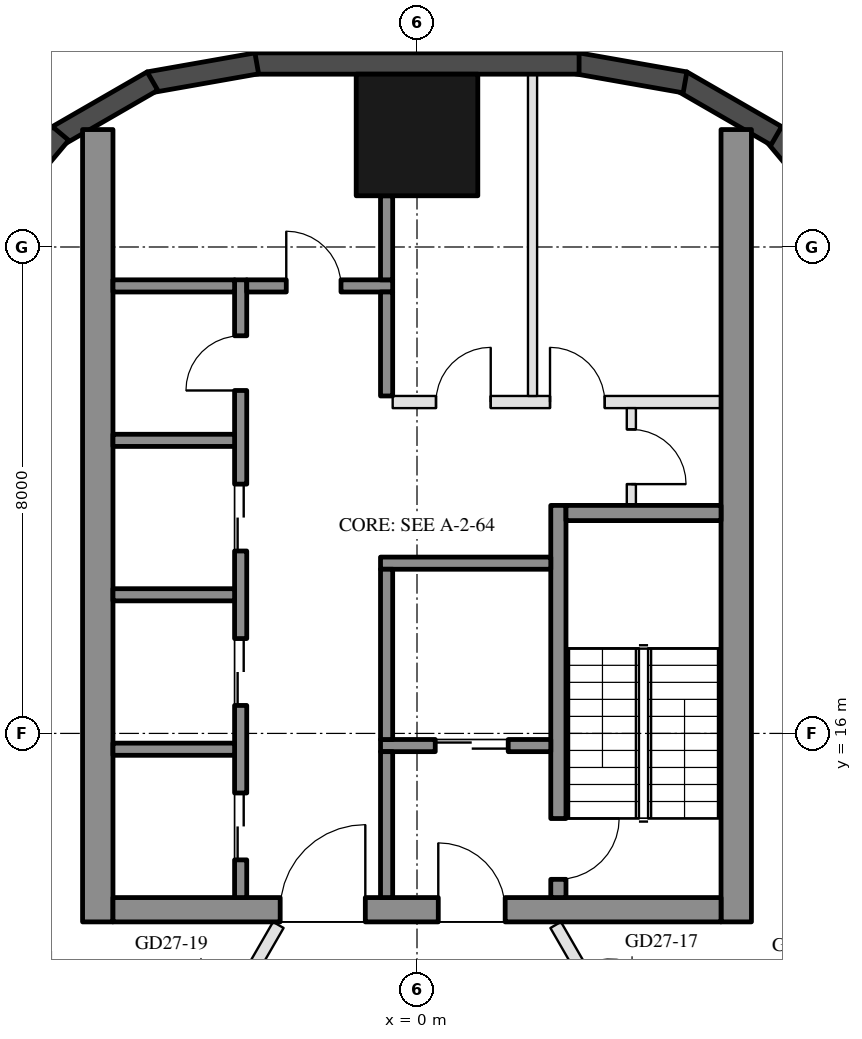
"""IFC4 building model, lengths in metres.
Left out: names, types, materials, properties, quantities, classifications, styles, units other than length and angle.
Written with IfcOpenShell. Run it as: python <this file> out.ifc"""

import sys

from ifc_helpers import new_model, si_unit, direction, frame, frame_2d, origin, origin_2d, place, context, subcontext, project, spatial, rectangle, hollow_rectangle, extrude, boolean, halfspace, element, fill, save


model = new_model("IFC4")
c1 = context("Model", 3, precision=1e-05, world=origin(), true_north=direction((0.0, 1.0)))
c2 = subcontext(c1, "Body", "Model", "MODEL_VIEW")
j1 = project(units=[si_unit("LENGTHUNIT", "METRE"), si_unit("PLANEANGLEUNIT", "RADIAN")], contexts=[c1])
p1 = place(None, origin())
s1 = spatial("IfcSite", under=j1, at=p1, CompositionType="ELEMENT")
p2 = place(p1, origin())
s2 = spatial("IfcBuilding", under=s1, at=p2, CompositionType="ELEMENT")
p3 = place(p2, frame((0.0, 0.0, 276.3)))
s3 = spatial("IfcBuildingStorey", under=s2, at=p3, CompositionType="ELEMENT", Elevation=276.3)
p4 = place(p3, frame((0.0, 25.843, 0.0), z_axis=(0.0, -0.21982618752, 0.975539054718), x_axis=(1.0, 0.0, 0.0)))
e1 = element("IfcColumn", 1, at=p4, inside=s3, PredefinedType="COLUMN", context=c2, shape_type="SweptSolid", body=[
    boolean("DIFFERENCE", boolean("DIFFERENCE", extrude(hollow_rectangle(XDim=2.0, YDim=2.0, WallThickness=0.05, at=origin_2d()), origin(), (0.0, 0.0, 1.0), 3.793), halfspace(frame((0.0, 0.0, 0.113), z_axis=(0.0, 0.0, 1.0), x_axis=(1.0, 0.0, 0.0)), True)), halfspace(frame((0.0, 0.0, 3.679), z_axis=(0.0, 0.0, 1.0), x_axis=(1.0, 0.0, 0.0)), False)),
])
p5 = place(p3, frame((7.019, 24.489, 0.0), z_axis=(0.0, 0.0, 1.0), x_axis=(-0.642756114672, 0.766070869471, 0.0)))
e2 = element("IfcWall", 2, at=p5, inside=s3, PredefinedType="SOLIDWALL", context=c2, shape_type="SweptSolid", body=[
    extrude(rectangle(XDim=1.8, YDim=0.35, at=frame_2d((0.9, 0.0))), origin(), (0.0, 0.0, 1.0), 3.55),
])
for number, where, z_axis, x_axis in (
    (3, (5.909, 25.829, 0.0), (0.0, 0.0, 1.0), (-0.866, 0.5, 0.0)),
    (4, (4.408, 26.708, 0.0), (0.0, 0.0, 1.0), (-0.985, 0.174, 0.0)),
):
    element("IfcWall", number, at=place(p3, frame(where, z_axis=z_axis, x_axis=x_axis)), inside=s3, PredefinedType="SOLIDWALL", context=c2, shape_type="SweptSolid", body=[
        extrude(rectangle(XDim=1.8, YDim=0.35, at=frame_2d((0.9, 0.0))), origin(), (0.0, 0.0, 1.0), 3.55),
    ])
p6 = place(p3, frame((2.666, 27.018, 0.0), z_axis=(0.0, 0.0, 1.0), x_axis=(-1.0, 0.0, 0.0)))
e5 = element("IfcWall", 5, at=p6, inside=s3, PredefinedType="SOLIDWALL", context=c2, shape_type="SweptSolid", body=[
    extrude(rectangle(XDim=5.331, YDim=0.35, at=frame_2d((2.666, 0.0))), origin(), (0.0, 0.0, 1.0), 3.55),
])
for number, where, z_axis, x_axis in (
    (6, (-2.635, 27.02, 0.0), (0.0, 0.0, 1.0), (-0.985, -0.174, 0.0)),
    (7, (-4.351, 26.729, 0.0), (0.0, 0.0, 1.0), (-0.866, -0.5, 0.0)),
):
    element("IfcWall", number, at=place(p3, frame(where, z_axis=z_axis, x_axis=x_axis)), inside=s3, PredefinedType="SOLIDWALL", context=c2, shape_type="SweptSolid", body=[
        extrude(rectangle(XDim=1.8, YDim=0.35, at=frame_2d((0.9, 0.0))), origin(), (0.0, 0.0, 1.0), 3.55),
    ])
p7 = place(p3, frame((-5.863, 25.868, 0.0), z_axis=(0.0, 0.0, 1.0), x_axis=(-0.642756114672, -0.766070869471, 0.0)))
e8 = element("IfcWall", 8, at=p7, inside=s3, PredefinedType="SOLIDWALL", context=c2, shape_type="SweptSolid", body=[
    extrude(rectangle(XDim=1.8, YDim=0.35, at=frame_2d((0.9, 0.0))), origin(), (0.0, 0.0, 1.0), 3.55),
])
for number, where, z_axis, x_axis in (
    (9, (5.25, 12.9, 0.0), (0.0, 0.0, 1.0), (0.0, 1.0, 0.0)),
    (10, (-5.25, 12.9, 0.0), (0.0, 0.0, 1.0), (0.0, 1.0, 0.0)),
):
    element("IfcWall", number, at=place(p3, frame(where, z_axis=z_axis, x_axis=x_axis)), inside=s3, PredefinedType="SHEAR", context=c2, shape_type="SweptSolid", body=[
        extrude(rectangle(XDim=13.031, YDim=0.5, at=frame_2d((6.516, 0.0))), origin(), (0.0, 0.0, 1.0), 3.5),
    ])
p8 = place(p3, frame((5.0, 13.1, 0.0), z_axis=(0.0, 0.0, 1.0), x_axis=(-1.0, 0.0, 0.0)))
e11 = element("IfcWall", 11, at=p8, inside=s3, PredefinedType="SHEAR", context=c2, shape_type="SweptSolid", body=[
    extrude(rectangle(XDim=10.0, YDim=0.4, at=frame_2d((5.0, 0.0))), origin(), (0.0, 0.0, 1.0), 3.5),
])
p9 = place(p8, frame((3.55, 0.0, 0.0)))
e12 = element("IfcOpeningElement", 12, at=p9, cuts=e11, PredefinedType="OPENING", context=c2, shape_type="SweptSolid", body=[
    extrude(rectangle(XDim=1.1, YDim=2.1, at=frame_2d((0.55, 1.05))), frame((0.0, 0.21, 0.0), z_axis=(0.0, -1.0, 0.0), x_axis=(1.0, 0.0, 0.0)), (0.0, 0.0, 1.0), 0.42),
])
p10 = place(p8, frame((5.85, 0.0, 0.0)))
e13 = element("IfcOpeningElement", 13, at=p10, cuts=e11, PredefinedType="OPENING", context=c2, shape_type="SweptSolid", body=[
    extrude(rectangle(XDim=1.4, YDim=2.1, at=frame_2d((0.7, 1.05))), frame((0.0, 0.21, 0.0), z_axis=(0.0, -1.0, 0.0), x_axis=(1.0, 0.0, 0.0)), (0.0, 0.0, 1.0), 0.42),
])
p11 = place(p3, frame((2.325, 13.3, 0.0), z_axis=(0.0, 0.0, 1.0), x_axis=(0.0, 1.0, 0.0)))
e14 = element("IfcWall", 14, at=p11, inside=s3, PredefinedType="SHEAR", context=c2, shape_type="SweptSolid", body=[
    extrude(rectangle(XDim=6.45, YDim=0.25, at=frame_2d((3.225, 0.0))), origin(), (0.0, 0.0, 1.0), 3.5),
])
p12 = place(p11, frame((0.3, 0.0, 0.0)))
e15 = element("IfcOpeningElement", 15, at=p12, cuts=e14, PredefinedType="OPENING", context=c2, shape_type="SweptSolid", body=[
    extrude(rectangle(XDim=1.0, YDim=2.1, at=frame_2d((0.5, 1.05))), frame((0.0, 0.135, 0.0), z_axis=(0.0, -1.0, 0.0), x_axis=(1.0, 0.0, 0.0)), (0.0, 0.0, 1.0), 0.27),
])
p13 = place(p3, frame((5.0, 19.625, 0.0), z_axis=(0.0, 0.0, 1.0), x_axis=(-1.0, 0.0, 0.0)))
e16 = element("IfcWall", 16, at=p13, inside=s3, PredefinedType="SHEAR", context=c2, shape_type="SweptSolid", body=[
    extrude(rectangle(XDim=2.55, YDim=0.25, at=frame_2d((1.275, 0.0))), origin(), (0.0, 0.0, 1.0), 3.5),
])
p14 = place(p3, frame((2.2, 18.8, 0.0), z_axis=(0.0, 0.0, 1.0), x_axis=(-1.0, 0.0, 0.0)))
e17 = element("IfcWall", 17, at=p14, inside=s3, PredefinedType="SHEAR", context=c2, shape_type="SweptSolid", body=[
    extrude(rectangle(XDim=2.8, YDim=0.2, at=frame_2d((1.4, 0.0))), origin(), (0.0, 0.0, 1.0), 3.5),
])
p15 = place(p3, frame((2.2, 15.8, 0.0), z_axis=(0.0, 0.0, 1.0), x_axis=(-1.0, 0.0, 0.0)))
e18 = element("IfcWall", 18, at=p15, inside=s3, PredefinedType="SHEAR", context=c2, shape_type="SweptSolid", body=[
    extrude(rectangle(XDim=2.8, YDim=0.2, at=frame_2d((1.4, 0.0))), origin(), (0.0, 0.0, 1.0), 3.5),
])
p16 = place(p15, frame((0.7, 0.0, 0.0)))
e19 = element("IfcOpeningElement", 19, at=p16, cuts=e18, PredefinedType="OPENING", context=c2, shape_type="SweptSolid", body=[
    extrude(rectangle(XDim=1.2, YDim=2.1, at=frame_2d((0.6, 1.05))), frame((0.0, 0.11, 0.0), z_axis=(0.0, -1.0, 0.0), x_axis=(1.0, 0.0, 0.0)), (0.0, 0.0, 1.0), 0.22),
])
p17 = place(p3, frame((-0.5, 15.9, 0.0), z_axis=(0.0, 0.0, 1.0), x_axis=(0.0, 1.0, 0.0)))
e20 = element("IfcWall", 20, at=p17, inside=s3, PredefinedType="SHEAR", context=c2, shape_type="SweptSolid", body=[
    extrude(rectangle(XDim=2.8, YDim=0.2, at=frame_2d((1.4, 0.0))), origin(), (0.0, 0.0, 1.0), 3.5),
])
p18 = place(p3, frame((-0.5, 13.3, 0.0), z_axis=(0.0, 0.0, 1.0), x_axis=(0.0, 1.0, 0.0)))
e21 = element("IfcWall", 21, at=p18, inside=s3, PredefinedType="SHEAR", context=c2, shape_type="SweptSolid", body=[
    extrude(rectangle(XDim=2.4, YDim=0.2, at=frame_2d((1.2, 0.0))), origin(), (0.0, 0.0, 1.0), 3.5),
])
p19 = place(p3, frame((-2.9, 13.3, 0.0), z_axis=(0.0, 0.0, 1.0), x_axis=(0.0, 1.0, 0.0)))
e22 = element("IfcWall", 22, at=p19, inside=s3, PredefinedType="SHEAR", context=c2, shape_type="SweptSolid", body=[
    extrude(rectangle(XDim=10.16, YDim=0.2, at=frame_2d((5.08, 0.0))), origin(), (0.0, 0.0, 1.0), 3.5),
])
p20 = place(p19, frame((0.62, 0.0, 0.0)))
e23 = element("IfcOpeningElement", 23, at=p20, cuts=e22, PredefinedType="OPENING", context=c2, shape_type="SweptSolid", body=[
    extrude(rectangle(XDim=1.1, YDim=2.1, at=frame_2d((0.55, 1.05))), frame((0.0, 0.11, 0.0), z_axis=(0.0, -1.0, 0.0), x_axis=(1.0, 0.0, 0.0)), (0.0, 0.0, 1.0), 0.22),
])
p21 = place(p19, frame((3.16, 0.0, 0.0)))
e24 = element("IfcOpeningElement", 24, at=p21, cuts=e22, PredefinedType="OPENING", context=c2, shape_type="SweptSolid", body=[
    extrude(rectangle(XDim=1.1, YDim=2.1, at=frame_2d((0.55, 1.05))), frame((0.0, 0.11, 0.0), z_axis=(0.0, -1.0, 0.0), x_axis=(1.0, 0.0, 0.0)), (0.0, 0.0, 1.0), 0.22),
])
p22 = place(p19, frame((5.7, 0.0, 0.0)))
e25 = element("IfcOpeningElement", 25, at=p22, cuts=e22, PredefinedType="OPENING", context=c2, shape_type="SweptSolid", body=[
    extrude(rectangle(XDim=1.1, YDim=2.1, at=frame_2d((0.55, 1.05))), frame((0.0, 0.11, 0.0), z_axis=(0.0, -1.0, 0.0), x_axis=(1.0, 0.0, 0.0)), (0.0, 0.0, 1.0), 0.22),
])
p23 = place(p19, frame((8.34, 0.0, 0.0)))
e26 = element("IfcOpeningElement", 26, at=p23, cuts=e22, PredefinedType="OPENING", context=c2, shape_type="SweptSolid", body=[
    extrude(rectangle(XDim=0.9, YDim=2.1, at=frame_2d((0.45, 1.05))), frame((0.0, 0.11, 0.0), z_axis=(0.0, -1.0, 0.0), x_axis=(1.0, 0.0, 0.0)), (0.0, 0.0, 1.0), 0.22),
])
p24 = place(p3, frame((-0.4, 23.36, 0.0), z_axis=(0.0, 0.0, 1.0), x_axis=(-1.0, 0.0, 0.0)))
e27 = element("IfcWall", 27, at=p24, inside=s3, PredefinedType="SHEAR", context=c2, shape_type="SweptSolid", body=[
    extrude(rectangle(XDim=2.4, YDim=0.2, at=frame_2d((1.2, 0.0))), origin(), (0.0, 0.0, 1.0), 3.5),
])
p25 = place(p24, frame((0.85, 0.0, 0.0)))
e28 = element("IfcOpeningElement", 28, at=p25, cuts=e27, PredefinedType="OPENING", context=c2, shape_type="SweptSolid", body=[
    extrude(rectangle(XDim=0.9, YDim=2.1, at=frame_2d((0.45, 1.05))), frame((0.0, 0.11, 0.0), z_axis=(0.0, -1.0, 0.0), x_axis=(1.0, 0.0, 0.0)), (0.0, 0.0, 1.0), 0.22),
])
p26 = place(p3, frame((-0.5, 21.55, 0.0), z_axis=(0.0, 0.0, 1.0), x_axis=(0.0, 1.0, 0.0)))
e29 = element("IfcWall", 29, at=p26, inside=s3, PredefinedType="SHEAR", context=c2, shape_type="SweptSolid", body=[
    extrude(rectangle(XDim=1.71, YDim=0.2, at=frame_2d((0.855, 0.0))), origin(), (0.0, 0.0, 1.0), 3.5),
])
for number, where, z_axis, x_axis in (
    (30, (-3.0, 15.74, 0.0), (0.0, 0.0, 1.0), (-1.0, 0.0, 0.0)),
    (31, (-3.0, 18.28, 0.0), (0.0, 0.0, 1.0), (-1.0, 0.0, 0.0)),
    (32, (-3.0, 20.82, 0.0), (0.0, 0.0, 1.0), (-1.0, 0.0, 0.0)),
    (33, (-3.0, 23.36, 0.0), (0.0, 0.0, 1.0), (-1.0, 0.0, 0.0)),
):
    element("IfcWall", number, at=place(p3, frame(where, z_axis=z_axis, x_axis=x_axis)), inside=s3, PredefinedType="SHEAR", context=c2, shape_type="SweptSolid", body=[
        extrude(rectangle(XDim=2.0, YDim=0.2, at=frame_2d((1.0, 0.0))), origin(), (0.0, 0.0, 1.0), 3.5),
    ])
p27 = place(p3, frame((-0.5, 23.46, 0.0), z_axis=(0.0, 0.0, 1.0), x_axis=(0.0, 1.0, 0.0)))
e34 = element("IfcWall", 34, at=p27, inside=s3, PredefinedType="SHEAR", context=c2, shape_type="SweptSolid", body=[
    extrude(rectangle(XDim=1.383, YDim=0.2, at=frame_2d((0.691, 0.0))), origin(), (0.0, 0.0, 1.0), 3.5),
])
p28 = place(p3, frame((5.0, 21.45, 0.0), z_axis=(0.0, 0.0, 1.0), x_axis=(-1.0, 0.0, 0.0)))
e35 = element("IfcWall", 35, at=p28, inside=s3, PredefinedType="PARTITIONING", context=c2, shape_type="SweptSolid", body=[
    extrude(rectangle(XDim=5.4, YDim=0.2, at=frame_2d((2.7, 0.0))), origin(), (0.0, 0.0, 1.0), 3.5),
])
p29 = place(p28, frame((1.913, 0.0, 0.0)))
e36 = element("IfcOpeningElement", 36, at=p29, cuts=e35, PredefinedType="OPENING", context=c2, shape_type="SweptSolid", body=[
    extrude(rectangle(XDim=0.9, YDim=2.1, at=frame_2d((0.45, 1.05))), frame((0.0, 0.11, 0.0), z_axis=(0.0, -1.0, 0.0), x_axis=(1.0, 0.0, 0.0)), (0.0, 0.0, 1.0), 0.22),
])
p30 = place(p28, frame((3.788, 0.0, 0.0)))
e37 = element("IfcOpeningElement", 37, at=p30, cuts=e35, PredefinedType="OPENING", context=c2, shape_type="SweptSolid", body=[
    extrude(rectangle(XDim=0.9, YDim=2.1, at=frame_2d((0.45, 1.05))), frame((0.0, 0.11, 0.0), z_axis=(0.0, -1.0, 0.0), x_axis=(1.0, 0.0, 0.0)), (0.0, 0.0, 1.0), 0.22),
])
p31 = place(p3, frame((3.525, 19.75, 0.0), z_axis=(0.0, 0.0, 1.0), x_axis=(0.0, 1.0, 0.0)))
e38 = element("IfcWall", 38, at=p31, inside=s3, PredefinedType="PARTITIONING", context=c2, shape_type="SweptSolid", body=[
    extrude(rectangle(XDim=1.6, YDim=0.15, at=frame_2d((0.8, 0.0))), origin(), (0.0, 0.0, 1.0), 3.5),
])
p32 = place(p31, frame((0.35, 0.0, 0.0)))
e39 = element("IfcOpeningElement", 39, at=p32, cuts=e38, PredefinedType="OPENING", context=c2, shape_type="SweptSolid", body=[
    extrude(rectangle(XDim=0.9, YDim=2.1, at=frame_2d((0.45, 1.05))), frame((0.0, 0.085, 0.0), z_axis=(0.0, -1.0, 0.0), x_axis=(1.0, 0.0, 0.0)), (0.0, 0.0, 1.0), 0.17),
])
p33 = place(p3, frame((1.9, 21.55, 0.0), z_axis=(0.0, 0.0, 1.0), x_axis=(0.0, 1.0, 0.0)))
e40 = element("IfcWall", 40, at=p33, inside=s3, PredefinedType="PARTITIONING", context=c2, shape_type="SweptSolid", body=[
    extrude(rectangle(XDim=5.292, YDim=0.15, at=frame_2d((2.646, 0.0))), origin(), (0.0, 0.0, 1.0), 3.5),
])
p34 = place(p3, frame((12.665, 14.356, 0.0), z_axis=(0.0, 0.0, 1.0), x_axis=(-0.86603115344, -0.499990041172, 0.0)))
e41 = element("IfcWall", 41, at=p34, inside=s3, PredefinedType="PARTITIONING", context=c2, shape_type="SweptSolid", body=[
    extrude(rectangle(XDim=9.846, YDim=0.2, at=frame_2d((4.923, 0.0))), origin(), (0.0, 0.0, 1.0), 3.1),
])
p35 = place(p3, frame((-12.162, 13.427, 0.0), z_axis=(0.0, 0.0, 1.0), x_axis=(0.895849808174, -0.444356974959, 0.0)))
e42 = element("IfcWall", 42, at=p35, inside=s3, PredefinedType="PARTITIONING", context=c2, shape_type="SweptSolid", body=[
    extrude(rectangle(XDim=8.964, YDim=0.2, at=frame_2d((4.482, 0.0))), origin(), (0.0, 0.0, 1.0), 3.1),
])
p36 = place(p3, frame((2.281, 12.85, 0.0), z_axis=(0.0, 0.0, 1.0), x_axis=(0.499979074716, -0.866037484666, 0.0)))
e43 = element("IfcWall", 43, at=p36, inside=s3, PredefinedType="PARTITIONING", context=c2, shape_type="SweptSolid", body=[
    extrude(rectangle(XDim=3.788, YDim=0.2, at=frame_2d((1.894, 0.0))), origin(), (0.0, 0.0, 1.0), 3.05),
])
p37 = place(p36, frame((0.8, 0.0, 0.0)))
e44 = element("IfcOpeningElement", 44, at=p37, cuts=e43, PredefinedType="OPENING", context=c2, shape_type="SweptSolid", body=[
    extrude(rectangle(XDim=1.0, YDim=2.1, at=frame_2d((0.5, 1.05))), frame((0.0, 0.11, 0.0), z_axis=(0.0, -1.0, 0.0), x_axis=(1.0, 0.0, 0.0)), (0.0, 0.0, 1.0), 0.22),
])
p38 = place(p3, frame((-4.171, 9.575, 0.0), z_axis=(0.0, 0.0, 1.0), x_axis=(0.49999255039, 0.866029704776, 0.0)))
e45 = element("IfcWall", 45, at=p38, inside=s3, PredefinedType="PARTITIONING", context=c2, shape_type="SweptSolid", body=[
    extrude(rectangle(XDim=3.782, YDim=0.2, at=frame_2d((1.891, 0.0))), origin(), (0.0, 0.0, 1.0), 3.05),
])
p39 = place(p38, frame((1.95, 0.0, 0.0)))
e46 = element("IfcOpeningElement", 46, at=p39, cuts=e45, PredefinedType="OPENING", context=c2, shape_type="SweptSolid", body=[
    extrude(rectangle(XDim=1.0, YDim=2.1, at=frame_2d((0.5, 1.05))), frame((0.0, 0.11, 0.0), z_axis=(0.0, -1.0, 0.0), x_axis=(1.0, 0.0, 0.0)), (0.0, 0.0, 1.0), 0.22),
])
p40 = place(p16, origin())
e47 = element("IfcDoor", 47, at=p40, inside=s3, OperationType="DOUBLE_DOOR_SLIDING", PredefinedType="DOOR", context=c2, shape_type="SweptSolid", body=[
    extrude(rectangle(XDim=1.2, YDim=2.1, at=frame_2d((0.6, 1.05))), frame((0.0, 0.025, 0.0), z_axis=(0.0, -1.0, 0.0), x_axis=(1.0, 0.0, 0.0)), (0.0, 0.0, 1.0), 0.05),
])
fill(e19, e47)
p41 = place(p32, frame((0.9, 0.0, 0.0), z_axis=(0.0, 0.0, 1.0), x_axis=(-1.0, 0.0, 0.0)))
e48 = element("IfcDoor", 48, at=p41, inside=s3, OperationType="SINGLE_SWING_RIGHT", PredefinedType="DOOR", context=c2, shape_type="SweptSolid", body=[
    extrude(rectangle(XDim=0.9, YDim=2.1, at=frame_2d((0.45, 1.05))), frame((0.0, 0.025, 0.0), z_axis=(0.0, -1.0, 0.0), x_axis=(1.0, 0.0, 0.0)), (0.0, 0.0, 1.0), 0.05),
])
fill(e39, e48)
p42 = place(p20, origin())
e49 = element("IfcDoor", 49, at=p42, inside=s3, OperationType="DOUBLE_DOOR_SLIDING", PredefinedType="DOOR", context=c2, shape_type="SweptSolid", body=[
    extrude(rectangle(XDim=1.1, YDim=2.1, at=frame_2d((0.55, 1.05))), frame((0.0, 0.025, 0.0), z_axis=(0.0, -1.0, 0.0), x_axis=(1.0, 0.0, 0.0)), (0.0, 0.0, 1.0), 0.05),
])
fill(e23, e49)
p43 = place(p21, origin())
e50 = element("IfcDoor", 50, at=p43, inside=s3, OperationType="DOUBLE_DOOR_SLIDING", PredefinedType="DOOR", context=c2, shape_type="SweptSolid", body=[
    extrude(rectangle(XDim=1.1, YDim=2.1, at=frame_2d((0.55, 1.05))), frame((0.0, 0.025, 0.0), z_axis=(0.0, -1.0, 0.0), x_axis=(1.0, 0.0, 0.0)), (0.0, 0.0, 1.0), 0.05),
])
fill(e24, e50)
p44 = place(p22, origin())
e51 = element("IfcDoor", 51, at=p44, inside=s3, OperationType="DOUBLE_DOOR_SLIDING", PredefinedType="DOOR", context=c2, shape_type="SweptSolid", body=[
    extrude(rectangle(XDim=1.1, YDim=2.1, at=frame_2d((0.55, 1.05))), frame((0.0, 0.025, 0.0), z_axis=(0.0, -1.0, 0.0), x_axis=(1.0, 0.0, 0.0)), (0.0, 0.0, 1.0), 0.05),
])
fill(e25, e51)
p45 = place(p23, origin())
e52 = element("IfcDoor", 52, at=p45, inside=s3, OperationType="SINGLE_SWING_LEFT", PredefinedType="DOOR", context=c2, shape_type="SweptSolid", body=[
    extrude(rectangle(XDim=0.9, YDim=2.1, at=frame_2d((0.45, 1.05))), frame((0.0, 0.025, 0.0), z_axis=(0.0, -1.0, 0.0), x_axis=(1.0, 0.0, 0.0)), (0.0, 0.0, 1.0), 0.05),
])
fill(e26, e52)
p46 = place(p25, frame((0.9, 0.0, 0.0), z_axis=(0.0, 0.0, 1.0), x_axis=(-1.0, 0.0, 0.0)))
e53 = element("IfcDoor", 53, at=p46, inside=s3, OperationType="SINGLE_SWING_LEFT", PredefinedType="DOOR", context=c2, shape_type="SweptSolid", body=[
    extrude(rectangle(XDim=0.9, YDim=2.1, at=frame_2d((0.45, 1.05))), frame((0.0, 0.025, 0.0), z_axis=(0.0, -1.0, 0.0), x_axis=(1.0, 0.0, 0.0)), (0.0, 0.0, 1.0), 0.05),
])
fill(e28, e53)
p47 = place(p29, frame((0.9, 0.0, 0.0), z_axis=(0.0, 0.0, 1.0), x_axis=(-1.0, 0.0, 0.0)))
e54 = element("IfcDoor", 54, at=p47, inside=s3, OperationType="SINGLE_SWING_LEFT", PredefinedType="DOOR", context=c2, shape_type="SweptSolid", body=[
    extrude(rectangle(XDim=0.9, YDim=2.1, at=frame_2d((0.45, 1.05))), frame((0.0, 0.025, 0.0), z_axis=(0.0, -1.0, 0.0), x_axis=(1.0, 0.0, 0.0)), (0.0, 0.0, 1.0), 0.05),
])
fill(e36, e54)
p48 = place(p30, frame((0.9, 0.0, 0.0), z_axis=(0.0, 0.0, 1.0), x_axis=(-1.0, 0.0, 0.0)))
e55 = element("IfcDoor", 55, at=p48, inside=s3, OperationType="SINGLE_SWING_RIGHT", PredefinedType="DOOR", context=c2, shape_type="SweptSolid", body=[
    extrude(rectangle(XDim=0.9, YDim=2.1, at=frame_2d((0.45, 1.05))), frame((0.0, 0.025, 0.0), z_axis=(0.0, -1.0, 0.0), x_axis=(1.0, 0.0, 0.0)), (0.0, 0.0, 1.0), 0.05),
])
fill(e37, e55)
p49 = place(p9, frame((1.1, 0.0, 0.0), z_axis=(0.0, 0.0, 1.0), x_axis=(-1.0, 0.0, 0.0)))
e56 = element("IfcDoor", 56, at=p49, inside=s3, OperationType="SINGLE_SWING_LEFT", PredefinedType="DOOR", context=c2, shape_type="SweptSolid", body=[
    extrude(rectangle(XDim=1.1, YDim=2.1, at=frame_2d((0.55, 1.05))), frame((0.0, 0.025, 0.0), z_axis=(0.0, -1.0, 0.0), x_axis=(1.0, 0.0, 0.0)), (0.0, 0.0, 1.0), 0.05),
])
fill(e12, e56)
p50 = place(p10, frame((1.4, 0.0, 0.0), z_axis=(0.0, 0.0, 1.0), x_axis=(-1.0, 0.0, 0.0)))
e57 = element("IfcDoor", 57, at=p50, inside=s3, OperationType="DOUBLE_DOOR_SINGLE_SWING", PredefinedType="DOOR", context=c2, shape_type="SweptSolid", body=[
    extrude(rectangle(XDim=1.4, YDim=2.1, at=frame_2d((0.7, 1.05))), frame((0.0, 0.025, 0.0), z_axis=(0.0, -1.0, 0.0), x_axis=(1.0, 0.0, 0.0)), (0.0, 0.0, 1.0), 0.05),
])
fill(e13, e57)
p51 = place(p12, frame((1.0, 0.0, 0.0), z_axis=(0.0, 0.0, 1.0), x_axis=(-1.0, 0.0, 0.0)))
e58 = element("IfcDoor", 58, at=p51, inside=s3, OperationType="SINGLE_SWING_LEFT", PredefinedType="DOOR", context=c2, shape_type="SweptSolid", body=[
    extrude(rectangle(XDim=1.0, YDim=2.1, at=frame_2d((0.5, 1.05))), frame((0.0, 0.025, 0.0), z_axis=(0.0, -1.0, 0.0), x_axis=(1.0, 0.0, 0.0)), (0.0, 0.0, 1.0), 0.05),
])
fill(e15, e58)
save(model, sys.argv[1])
